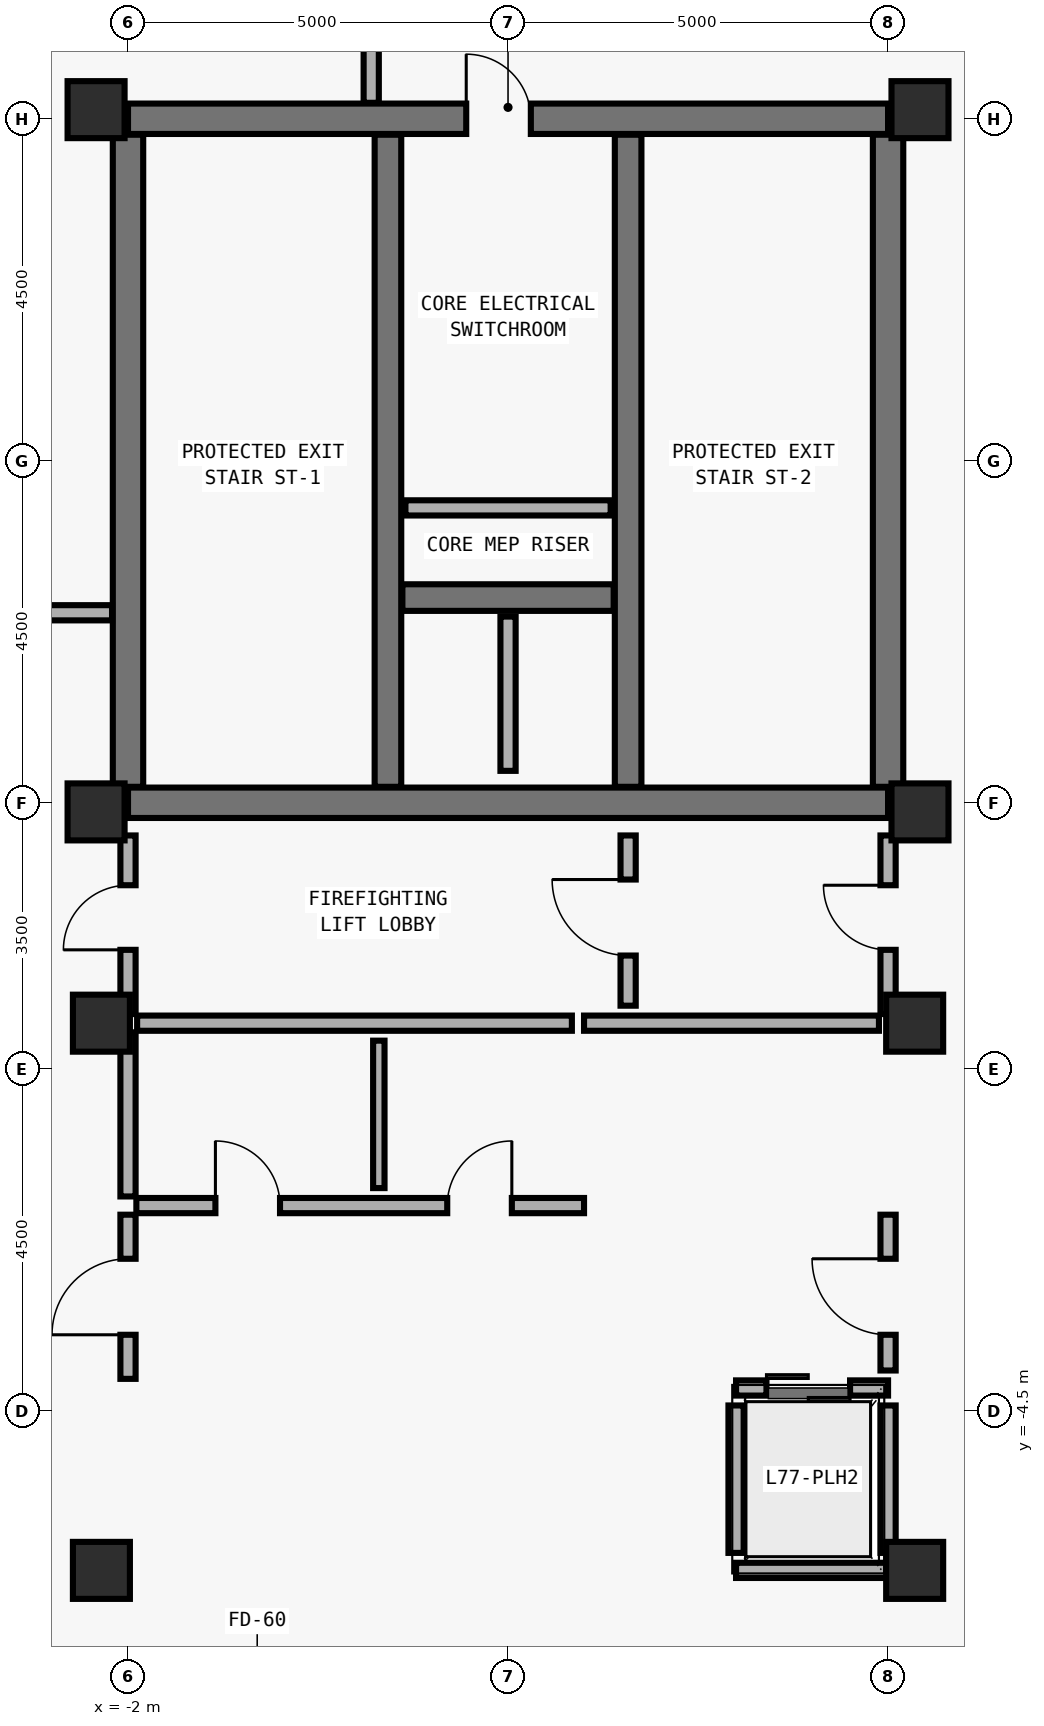
"""IFC4 building model, lengths in metres.
Left out: names, types, materials, properties, quantities, classifications, styles, units other than length and angle.
Written with IfcOpenShell. Run it as: python <this file> out.ifc"""

import sys

from ifc_helpers import new_model, si_unit, direction, frame, frame_2d, origin, origin_2d, place, context, subcontext, project, spatial, rectangle, extrude, element, fill, save


model = new_model("IFC4")
c1 = context("Model", 3, precision=1e-05, world=origin(), true_north=direction((0.0, 1.0)))
c2 = subcontext(c1, "Body", "Model", "MODEL_VIEW")
j1 = project(units=[si_unit("LENGTHUNIT", "METRE"), si_unit("PLANEANGLEUNIT", "RADIAN")], contexts=[c1])
p1 = place(None, origin())
s1 = spatial("IfcSite", under=j1, at=p1, CompositionType="ELEMENT")
p2 = place(p1, origin())
s2 = spatial("IfcBuilding", under=s1, at=p2, CompositionType="ELEMENT")
p3 = place(p2, frame((0.0, 0.0, 302.4)))
s3 = spatial("IfcBuildingStorey", under=s2, at=p3, CompositionType="ELEMENT", Elevation=302.4)
p4 = place(p3, frame((-2.0, 3.5, 0.0), z_axis=(0.0, 0.0, 1.0), x_axis=(1.0, 0.0, 0.0)))
e1 = element("IfcWall", 1, at=p4, inside=s3, PredefinedType="SHEAR", context=c2, shape_type="SweptSolid", body=[
    extrude(rectangle(XDim=10.0, YDim=0.4, at=frame_2d((5.0, 0.0))), origin(), (0.0, 0.0, 1.0), 4.192),
])
p5 = place(p3, frame((-2.0, 12.5, 0.0), z_axis=(0.0, 0.0, 1.0), x_axis=(1.0, 0.0, 0.0)))
e2 = element("IfcWall", 2, at=p5, inside=s3, PredefinedType="SHEAR", context=c2, shape_type="SweptSolid", body=[
    extrude(rectangle(XDim=10.0, YDim=0.4, at=frame_2d((5.0, 0.0))), origin(), (0.0, 0.0, 1.0), 4.192),
])
p6 = place(p5, frame((4.45, 0.0, 0.0)))
e3 = element("IfcOpeningElement", 3, at=p6, cuts=e2, PredefinedType="OPENING", context=c2, shape_type="SweptSolid", body=[
    extrude(rectangle(XDim=0.85, YDim=2.1, at=frame_2d((0.425, 1.05))), frame((0.0, 0.21, 0.0), z_axis=(0.0, -1.0, 0.0), x_axis=(1.0, 0.0, 0.0)), (0.0, 0.0, 1.0), 0.42),
])
for number, where, z_axis, x_axis in (
    (4, (-2.0, 3.71, 0.0), (0.0, 0.0, 1.0), (0.0, 1.0, 0.0)),
    (5, (8.0, 3.71, 0.0), (0.0, 0.0, 1.0), (0.0, 1.0, 0.0)),
):
    element("IfcWall", number, at=place(p3, frame(where, z_axis=z_axis, x_axis=x_axis)), inside=s3, PredefinedType="SHEAR", context=c2, shape_type="SweptSolid", body=[
        extrude(rectangle(XDim=8.58, YDim=0.4, at=frame_2d((4.29, 0.0))), origin(), (0.0, 0.0, 1.0), 4.192),
    ])
for number, where, z_axis, x_axis in (
    (6, (1.42, 3.71, 0.0), (0.0, 0.0, 1.0), (0.0, 1.0, 0.0)),
    (7, (4.58, 3.71, 0.0), (0.0, 0.0, 1.0), (0.0, 1.0, 0.0)),
):
    element("IfcWall", number, at=place(p3, frame(where, z_axis=z_axis, x_axis=x_axis)), inside=s3, PredefinedType="SHEAR", context=c2, shape_type="SweptSolid", body=[
        extrude(rectangle(XDim=8.58, YDim=0.35, at=frame_2d((4.29, 0.0))), origin(), (0.0, 0.0, 1.0), 4.192),
    ])
p7 = place(p3, frame((1.61, 6.2, 0.0), z_axis=(0.0, 0.0, 1.0), x_axis=(1.0, 0.0, 0.0)))
e8 = element("IfcWall", 8, at=p7, inside=s3, PredefinedType="SHEAR", context=c2, shape_type="SweptSolid", body=[
    extrude(rectangle(XDim=2.78, YDim=0.35, at=frame_2d((1.39, 0.0))), origin(), (0.0, 0.0, 1.0), 4.192),
])
for number, where, z_axis, x_axis in (
    (9, (-2.42, 12.62, 0.0), (0.0, 0.0, 1.0), (1.0, 0.0, 0.0)),
    (10, (8.42, 12.62, 0.0), (0.0, 0.0, 1.0), (1.0, 0.0, 0.0)),
    (11, (-2.42, 3.38, 0.0), (0.0, 0.0, 1.0), (1.0, 0.0, 0.0)),
    (12, (8.42, 3.38, 0.0), (0.0, 0.0, 1.0), (1.0, 0.0, 0.0)),
    (13, (-2.35, 0.6, 0.0), (0.0, 0.0, 1.0), (1.0, 0.0, 0.0)),
    (14, (8.35, 0.6, 0.0), (0.0, 0.0, 1.0), (1.0, 0.0, 0.0)),
    (15, (-2.35, -6.6, 0.0), (0.0, 0.0, 1.0), (1.0, 0.0, 0.0)),
    (16, (8.35, -6.6, 0.0), (0.0, 0.0, 1.0), (1.0, 0.0, 0.0)),
):
    element("IfcColumn", number, at=place(p3, frame(where, z_axis=z_axis, x_axis=x_axis)), inside=s3, PredefinedType="COLUMN", context=c2, shape_type="SweptSolid", body=[
        extrude(rectangle(XDim=0.75, YDim=0.75, at=origin_2d()), origin(), (0.0, 0.0, 1.0), 4.175),
    ])
p8 = place(p3, frame((3.0, 3.92, 0.0), z_axis=(0.0, 0.0, 1.0), x_axis=(0.0, 1.0, 0.0)))
e17 = element("IfcWall", 17, at=p8, inside=s3, PredefinedType="SOLIDWALL", context=c2, shape_type="SweptSolid", body=[
    extrude(rectangle(XDim=2.03, YDim=0.2, at=frame_2d((1.015, 0.0))), origin(), (0.0, 0.0, 1.0), 3.96),
])
p9 = place(p3, frame((1.65, 7.38, 0.0), z_axis=(0.0, 0.0, 1.0), x_axis=(1.0, 0.0, 0.0)))
e18 = element("IfcWall", 18, at=p9, inside=s3, PredefinedType="SOLIDWALL", context=c2, shape_type="SweptSolid", body=[
    extrude(rectangle(XDim=2.7, YDim=0.2, at=frame_2d((1.35, 0.0))), origin(), (0.0, 0.0, 1.0), 3.96),
])
p10 = place(p3, frame((4.0, 0.6, 0.0), z_axis=(0.0, 0.0, 1.0), x_axis=(1.0, 0.0, 0.0)))
e19 = element("IfcWall", 19, at=p10, inside=s3, PredefinedType="SOLIDWALL", context=c2, shape_type="SweptSolid", body=[
    extrude(rectangle(XDim=3.88, YDim=0.2, at=frame_2d((1.94, 0.0))), origin(), (0.0, 0.0, 1.0), 3.672),
])
p11 = place(p3, frame((6.0, -4.2, 0.0), z_axis=(0.0, 0.0, 1.0), x_axis=(1.0, 0.0, 0.0)))
e20 = element("IfcWall", 20, at=p11, inside=s3, PredefinedType="SOLIDWALL", context=c2, shape_type="SweptSolid", body=[
    extrude(rectangle(XDim=2.0, YDim=0.2, at=frame_2d((1.0, 0.0))), origin(), (0.0, 0.0, 1.0), 3.96),
])
p12 = place(p11, frame((0.4, 0.0, 0.0)))
e21 = element("IfcOpeningElement", 21, at=p12, cuts=e20, PredefinedType="OPENING", context=c2, shape_type="SweptSolid", body=[
    extrude(rectangle(XDim=1.1, YDim=2.2, at=frame_2d((0.55, 1.1))), frame((0.0, 0.11, 0.0), z_axis=(0.0, -1.0, 0.0), x_axis=(1.0, 0.0, 0.0)), (0.0, 0.0, 1.0), 0.22),
])
p13 = place(p3, frame((6.0, -6.6, 0.0), z_axis=(0.0, 0.0, 1.0), x_axis=(1.0, 0.0, 0.0)))
e22 = element("IfcWall", 22, at=p13, inside=s3, PredefinedType="SOLIDWALL", context=c2, shape_type="SweptSolid", body=[
    extrude(rectangle(XDim=2.0, YDim=0.2, at=frame_2d((1.0, 0.0))), origin(), (0.0, 0.0, 1.0), 3.672),
])
p14 = place(p3, frame((6.0, -6.37, 0.0), z_axis=(0.0, 0.0, 1.0), x_axis=(0.0, 1.0, 0.0)))
e23 = element("IfcWall", 23, at=p14, inside=s3, PredefinedType="SOLIDWALL", context=c2, shape_type="SweptSolid", body=[
    extrude(rectangle(XDim=1.94, YDim=0.2, at=frame_2d((0.97, 0.0))), origin(), (0.0, 0.0, 1.0), 3.96),
])
p15 = place(p3, frame((8.0, -6.37, 0.0), z_axis=(0.0, 0.0, 1.0), x_axis=(0.0, 1.0, 0.0)))
e24 = element("IfcWall", 24, at=p15, inside=s3, PredefinedType="SOLIDWALL", context=c2, shape_type="SweptSolid", body=[
    extrude(rectangle(XDim=1.94, YDim=0.2, at=frame_2d((0.97, 0.0))), origin(), (0.0, 0.0, 1.0), 3.672),
])
p16 = place(p3, frame((4.58, 0.83, 0.0), z_axis=(0.0, 0.0, 1.0), x_axis=(0.0, 1.0, 0.0)))
e25 = element("IfcWall", 25, at=p16, inside=s3, PredefinedType="MOVABLE", context=c2, shape_type="SweptSolid", body=[
    extrude(rectangle(XDim=2.24, YDim=0.2, at=frame_2d((1.12, 0.0))), origin(), (0.0, 0.0, 1.0), 3.96),
])
p17 = place(p16, frame((0.66, 0.0, 0.0)))
e26 = element("IfcOpeningElement", 26, at=p17, cuts=e25, PredefinedType="OPENING", context=c2, shape_type="SweptSolid", body=[
    extrude(rectangle(XDim=1.0, YDim=2.1, at=frame_2d((0.5, 1.05))), frame((0.0, 0.11, 0.0), z_axis=(0.0, -1.0, 0.0), x_axis=(1.0, 0.0, 0.0)), (0.0, 0.0, 1.0), 0.22),
])
p18 = place(p3, frame((-2.0, 0.72, 0.0), z_axis=(0.0, 0.0, 1.0), x_axis=(0.0, 1.0, 0.0)))
e27 = element("IfcWall", 27, at=p18, inside=s3, PredefinedType="MOVABLE", context=c2, shape_type="SweptSolid", body=[
    extrude(rectangle(XDim=2.35, YDim=0.2, at=frame_2d((1.175, 0.0))), origin(), (0.0, 0.0, 1.0), 3.292),
])
p19 = place(p18, frame((0.845, 0.0, 0.0)))
e28 = element("IfcOpeningElement", 28, at=p19, cuts=e27, PredefinedType="OPENING", context=c2, shape_type="SweptSolid", body=[
    extrude(rectangle(XDim=0.85, YDim=2.1, at=frame_2d((0.425, 1.05))), frame((0.0, 0.11, 0.0), z_axis=(0.0, -1.0, 0.0), x_axis=(1.0, 0.0, 0.0)), (0.0, 0.0, 1.0), 0.22),
])
p20 = place(p3, frame((8.0, 0.72, 0.0), z_axis=(0.0, 0.0, 1.0), x_axis=(0.0, 1.0, 0.0)))
e29 = element("IfcWall", 29, at=p20, inside=s3, PredefinedType="MOVABLE", context=c2, shape_type="SweptSolid", body=[
    extrude(rectangle(XDim=2.35, YDim=0.2, at=frame_2d((1.175, 0.0))), origin(), (0.0, 0.0, 1.0), 3.292),
])
p21 = place(p20, frame((0.845, 0.0, 0.0)))
e30 = element("IfcOpeningElement", 30, at=p21, cuts=e29, PredefinedType="OPENING", context=c2, shape_type="SweptSolid", body=[
    extrude(rectangle(XDim=0.85, YDim=2.1, at=frame_2d((0.425, 1.05))), frame((0.0, 0.11, 0.0), z_axis=(0.0, -1.0, 0.0), x_axis=(1.0, 0.0, 0.0)), (0.0, 0.0, 1.0), 0.22),
])
p22 = place(p3, frame((-2.0, -4.08, 0.0), z_axis=(0.0, 0.0, 1.0), x_axis=(0.0, 1.0, 0.0)))
e31 = element("IfcWall", 31, at=p22, inside=s3, PredefinedType="MOVABLE", context=c2, shape_type="SweptSolid", body=[
    extrude(rectangle(XDim=2.16, YDim=0.2, at=frame_2d((1.08, 0.0))), origin(), (0.0, 0.0, 1.0), 3.672),
])
p23 = place(p22, frame((0.58, 0.0, 0.0)))
e32 = element("IfcOpeningElement", 32, at=p23, cuts=e31, PredefinedType="OPENING", context=c2, shape_type="SweptSolid", body=[
    extrude(rectangle(XDim=1.0, YDim=2.1, at=frame_2d((0.5, 1.05))), frame((0.0, 0.11, 0.0), z_axis=(0.0, -1.0, 0.0), x_axis=(1.0, 0.0, 0.0)), (0.0, 0.0, 1.0), 0.22),
])
p24 = place(p3, frame((8.0, -3.97, 0.0), z_axis=(0.0, 0.0, 1.0), x_axis=(0.0, 1.0, 0.0)))
e33 = element("IfcWall", 33, at=p24, inside=s3, PredefinedType="MOVABLE", context=c2, shape_type="SweptSolid", body=[
    extrude(rectangle(XDim=2.05, YDim=0.2, at=frame_2d((1.025, 0.0))), origin(), (0.0, 0.0, 1.0), 3.672),
])
p25 = place(p24, frame((0.47, 0.0, 0.0)))
e34 = element("IfcOpeningElement", 34, at=p25, cuts=e33, PredefinedType="OPENING", context=c2, shape_type="SweptSolid", body=[
    extrude(rectangle(XDim=1.0, YDim=2.1, at=frame_2d((0.5, 1.05))), frame((0.0, 0.11, 0.0), z_axis=(0.0, -1.0, 0.0), x_axis=(1.0, 0.0, 0.0)), (0.0, 0.0, 1.0), 0.22),
])
p26 = place(p3, frame((-1.89, -1.8, 0.0), z_axis=(0.0, 0.0, 1.0), x_axis=(1.0, 0.0, 0.0)))
e35 = element("IfcWall", 35, at=p26, inside=s3, PredefinedType="MOVABLE", context=c2, shape_type="SweptSolid", body=[
    extrude(rectangle(XDim=5.89, YDim=0.2, at=frame_2d((2.945, 0.0))), origin(), (0.0, 0.0, 1.0), 3.96),
])
p27 = place(p26, frame((1.04, 0.0, 0.0)))
e36 = element("IfcOpeningElement", 36, at=p27, cuts=e35, PredefinedType="OPENING", context=c2, shape_type="SweptSolid", body=[
    extrude(rectangle(XDim=0.85, YDim=2.1, at=frame_2d((0.425, 1.05))), frame((0.0, 0.11, 0.0), z_axis=(0.0, -1.0, 0.0), x_axis=(1.0, 0.0, 0.0)), (0.0, 0.0, 1.0), 0.22),
])
p28 = place(p26, frame((4.09, 0.0, 0.0)))
e37 = element("IfcOpeningElement", 37, at=p28, cuts=e35, PredefinedType="OPENING", context=c2, shape_type="SweptSolid", body=[
    extrude(rectangle(XDim=0.85, YDim=2.1, at=frame_2d((0.425, 1.05))), frame((0.0, 0.11, 0.0), z_axis=(0.0, -1.0, 0.0), x_axis=(1.0, 0.0, 0.0)), (0.0, 0.0, 1.0), 0.22),
])
p29 = place(p3, frame((-1.88, 0.6, 0.0), z_axis=(0.0, 0.0, 1.0), x_axis=(1.0, 0.0, 0.0)))
e38 = element("IfcWall", 38, at=p29, inside=s3, PredefinedType="MOVABLE", context=c2, shape_type="SweptSolid", body=[
    extrude(rectangle(XDim=5.72, YDim=0.2, at=frame_2d((2.86, 0.0))), origin(), (0.0, 0.0, 1.0), 3.672),
])
p30 = place(p3, frame((1.3, -1.57, 0.0), z_axis=(0.0, 0.0, 1.0), x_axis=(0.0, 1.0, 0.0)))
e39 = element("IfcWall", 39, at=p30, inside=s3, PredefinedType="PARTITIONING", context=c2, shape_type="SweptSolid", body=[
    extrude(rectangle(XDim=1.94, YDim=0.15, at=frame_2d((0.97, 0.0))), origin(), (0.0, 0.0, 1.0), 3.96),
])
p31 = place(p3, frame((-2.0, -1.68, 0.0), z_axis=(0.0, 0.0, 1.0), x_axis=(0.0, 1.0, 0.0)))
e40 = element("IfcWall", 40, at=p31, inside=s3, PredefinedType="MOVABLE", context=c2, shape_type="SweptSolid", body=[
    extrude(rectangle(XDim=2.16, YDim=0.2, at=frame_2d((1.08, 0.0))), origin(), (0.0, 0.0, 1.0), 3.672),
])
p32 = place(p3, frame((-2.21, 6.0, 0.0), z_axis=(0.0, 0.0, 1.0), x_axis=(-1.0, 0.0, 0.0)))
e41 = element("IfcWall", 41, at=p32, inside=s3, PredefinedType="MOVABLE", context=c2, shape_type="SweptSolid", body=[
    extrude(rectangle(XDim=2.28, YDim=0.2, at=frame_2d((1.14, 0.0))), origin(), (0.0, 0.0, 1.0), 3.96),
])
p33 = place(p3, frame((1.2, 14.49, 0.0), z_axis=(0.0, 0.0, 1.0), x_axis=(0.0, -1.0, 0.0)))
e42 = element("IfcWall", 42, at=p33, inside=s3, PredefinedType="MOVABLE", context=c2, shape_type="SweptSolid", body=[
    extrude(rectangle(XDim=1.78, YDim=0.2, at=frame_2d((0.89, 0.0))), origin(), (0.0, 0.0, 1.0), 3.96),
])
p34 = place(p6, origin())
e43 = element("IfcDoor", 43, at=p34, inside=s3, OperationType="SINGLE_SWING_LEFT", PredefinedType="DOOR", context=c2, shape_type="SweptSolid", body=[
    extrude(rectangle(XDim=0.85, YDim=2.1, at=frame_2d((0.425, 1.05))), frame((0.0, 0.025, 0.0), z_axis=(0.0, -1.0, 0.0), x_axis=(1.0, 0.0, 0.0)), (0.0, 0.0, 1.0), 0.05),
])
fill(e3, e43)
p35 = place(p17, origin())
e44 = element("IfcDoor", 44, at=p35, inside=s3, OperationType="SINGLE_SWING_RIGHT", PredefinedType="DOOR", context=c2, shape_type="SweptSolid", body=[
    extrude(rectangle(XDim=1.0, YDim=2.1, at=frame_2d((0.5, 1.05))), frame((0.0, 0.025, 0.0), z_axis=(0.0, -1.0, 0.0), x_axis=(1.0, 0.0, 0.0)), (0.0, 0.0, 1.0), 0.05),
])
fill(e26, e44)
p36 = place(p19, origin())
e45 = element("IfcDoor", 45, at=p36, inside=s3, OperationType="SINGLE_SWING_LEFT", PredefinedType="DOOR", context=c2, shape_type="SweptSolid", body=[
    extrude(rectangle(XDim=0.85, YDim=2.1, at=frame_2d((0.425, 1.05))), frame((0.0, 0.025, 0.0), z_axis=(0.0, -1.0, 0.0), x_axis=(1.0, 0.0, 0.0)), (0.0, 0.0, 1.0), 0.05),
])
fill(e28, e45)
p37 = place(p21, origin())
e46 = element("IfcDoor", 46, at=p37, inside=s3, OperationType="SINGLE_SWING_RIGHT", PredefinedType="DOOR", context=c2, shape_type="SweptSolid", body=[
    extrude(rectangle(XDim=0.85, YDim=2.1, at=frame_2d((0.425, 1.05))), frame((0.0, 0.025, 0.0), z_axis=(0.0, -1.0, 0.0), x_axis=(1.0, 0.0, 0.0)), (0.0, 0.0, 1.0), 0.05),
])
fill(e30, e46)
p38 = place(p23, origin())
e47 = element("IfcDoor", 47, at=p38, inside=s3, OperationType="SINGLE_SWING_LEFT", PredefinedType="DOOR", context=c2, shape_type="SweptSolid", body=[
    extrude(rectangle(XDim=1.0, YDim=2.1, at=frame_2d((0.5, 1.05))), frame((0.0, 0.025, 0.0), z_axis=(0.0, -1.0, 0.0), x_axis=(1.0, 0.0, 0.0)), (0.0, 0.0, 1.0), 0.05),
])
fill(e32, e47)
p39 = place(p25, origin())
e48 = element("IfcDoor", 48, at=p39, inside=s3, OperationType="SINGLE_SWING_RIGHT", PredefinedType="DOOR", context=c2, shape_type="SweptSolid", body=[
    extrude(rectangle(XDim=1.0, YDim=2.1, at=frame_2d((0.5, 1.05))), frame((0.0, 0.025, 0.0), z_axis=(0.0, -1.0, 0.0), x_axis=(1.0, 0.0, 0.0)), (0.0, 0.0, 1.0), 0.05),
])
fill(e34, e48)
p40 = place(p27, origin())
e49 = element("IfcDoor", 49, at=p40, inside=s3, OperationType="SINGLE_SWING_LEFT", PredefinedType="DOOR", context=c2, shape_type="SweptSolid", body=[
    extrude(rectangle(XDim=0.85, YDim=2.1, at=frame_2d((0.425, 1.05))), frame((0.0, 0.025, 0.0), z_axis=(0.0, -1.0, 0.0), x_axis=(1.0, 0.0, 0.0)), (0.0, 0.0, 1.0), 0.05),
])
fill(e36, e49)
p41 = place(p28, origin())
e50 = element("IfcDoor", 50, at=p41, inside=s3, OperationType="SINGLE_SWING_RIGHT", PredefinedType="DOOR", context=c2, shape_type="SweptSolid", body=[
    extrude(rectangle(XDim=0.85, YDim=2.1, at=frame_2d((0.425, 1.05))), frame((0.0, 0.025, 0.0), z_axis=(0.0, -1.0, 0.0), x_axis=(1.0, 0.0, 0.0)), (0.0, 0.0, 1.0), 0.05),
])
fill(e37, e50)
p42 = place(p12, origin())
e51 = element("IfcDoor", 51, at=p42, inside=s3, OperationType="DOUBLE_DOOR_SLIDING", PredefinedType="DOOR", context=c2, shape_type="SweptSolid", body=[
    extrude(rectangle(XDim=1.1, YDim=2.2, at=frame_2d((0.55, 1.1))), frame((0.0, 0.025, 0.0), z_axis=(0.0, -1.0, 0.0), x_axis=(1.0, 0.0, 0.0)), (0.0, 0.0, 1.0), 0.05),
])
fill(e21, e51)
save(model, sys.argv[1])
